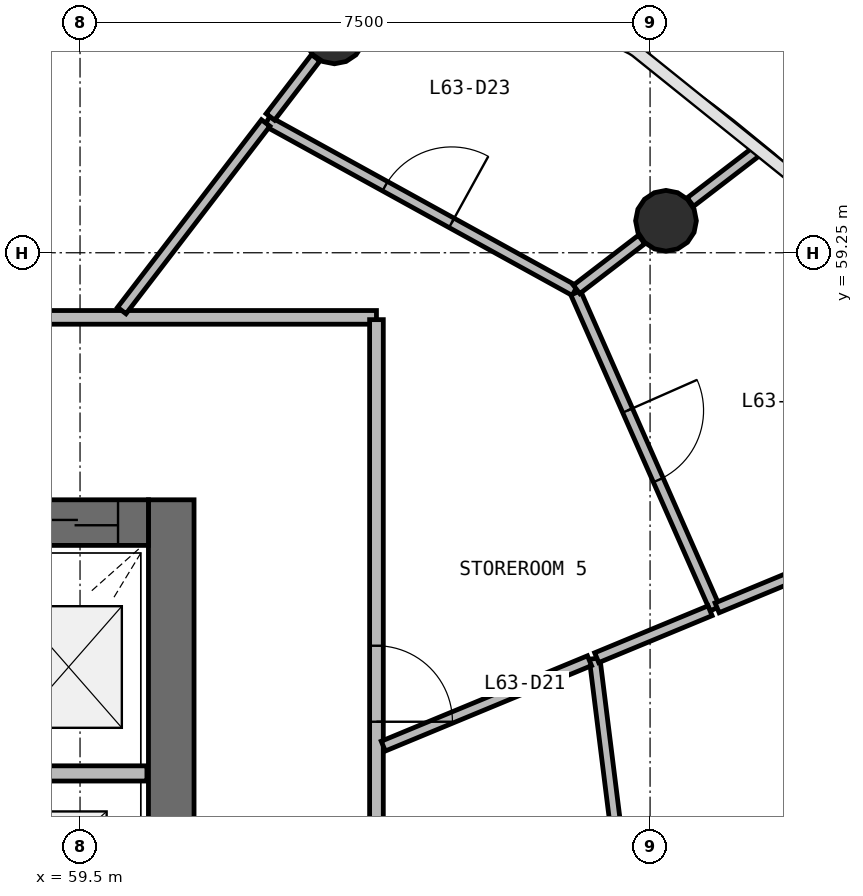
"""IFC4 building model, lengths in metres.
Left out: names, types, materials, properties, quantities, classifications, styles, units other than length and angle.
Written with IfcOpenShell. Run it as: python <this file> out.ifc"""

import sys

from ifc_helpers import new_model, si_unit, direction, frame, frame_2d, origin, origin_2d, place, context, subcontext, project, spatial, rectangle, circle, extrude, source, transform, mapped, element, fill, save


model = new_model("IFC4")
c1 = context("Model", 3, precision=1e-05, world=origin(), true_north=direction((0.0, 1.0)))
c2 = subcontext(c1, "Body", "Model", "MODEL_VIEW")
j1 = project(units=[si_unit("LENGTHUNIT", "METRE"), si_unit("PLANEANGLEUNIT", "RADIAN")], contexts=[c1])
p1 = place(None, origin())
s1 = spatial("IfcSite", under=j1, at=p1, CompositionType="ELEMENT")
p2 = place(p1, origin())
s2 = spatial("IfcBuilding", under=s1, at=p2, CompositionType="ELEMENT")
p3 = place(p2, frame((0.0, 0.0, 257.9)))
s3 = spatial("IfcBuildingStorey", under=s2, at=p3, CompositionType="ELEMENT", Elevation=257.9)
p4 = place(p3, frame((60.7, 40.0, 0.0), z_axis=(0.0, 0.0, 1.0), x_axis=(0.0, 1.0, 0.0)))
e1 = element("IfcWall", 1, at=p4, inside=s3, PredefinedType="SHEAR", context=c2, shape_type="SweptSolid", body=[
    extrude(rectangle(XDim=16.0, YDim=0.6, at=frame_2d((8.0, 0.0))), origin(), (0.0, 0.0, 1.0), 3.9),
])
p5 = place(p4, frame((7.1, 0.0, 0.0)))
e2 = element("IfcOpeningElement", 2, at=p5, cuts=e1, PredefinedType="OPENING", context=c2, shape_type="SweptSolid", body=[
    extrude(rectangle(XDim=1.8, YDim=2.1, at=frame_2d((0.9, 1.05))), frame((0.0, 0.31, 0.0), z_axis=(0.0, -1.0, 0.0), x_axis=(1.0, 0.0, 0.0)), (0.0, 0.0, 1.0), 0.62),
])
p6 = place(p3, frame((60.4, 55.7, 0.0), z_axis=(0.0, 0.0, 1.0), x_axis=(-1.0, 0.0, 0.0)))
e3 = element("IfcWall", 3, at=p6, inside=s3, PredefinedType="SHEAR", context=c2, shape_type="SweptSolid", body=[
    extrude(rectangle(XDim=16.8, YDim=0.6, at=frame_2d((8.4, 0.0))), origin(), (0.0, 0.0, 1.0), 3.9),
])
p7 = place(p6, frame((0.4, 0.0, 0.0)))
e4 = element("IfcOpeningElement", 4, at=p7, cuts=e3, PredefinedType="OPENING", context=c2, shape_type="SweptSolid", body=[
    extrude(rectangle(XDim=1.1, YDim=2.1, at=frame_2d((0.55, 1.05))), frame((0.0, 0.31, 0.0), z_axis=(0.0, -1.0, 0.0), x_axis=(1.0, 0.0, 0.0)), (0.0, 0.0, 1.0), 0.62),
])
p8 = place(p6, frame((10.3, 0.0, 0.0)))
e5 = element("IfcOpeningElement", 5, at=p8, cuts=e3, PredefinedType="OPENING", context=c2, shape_type="SweptSolid", body=[
    extrude(rectangle(XDim=1.2, YDim=2.1, at=frame_2d((0.6, 1.05))), frame((0.0, 0.31, 0.0), z_axis=(0.0, -1.0, 0.0), x_axis=(1.0, 0.0, 0.0)), (0.0, 0.0, 1.0), 0.62),
])
p9 = place(p6, frame((7.25, 0.0, 0.0)))
e6 = element("IfcOpeningElement", 6, at=p9, cuts=e3, PredefinedType="OPENING", context=c2, shape_type="SweptSolid", body=[
    extrude(rectangle(XDim=1.1, YDim=2.1, at=frame_2d((0.55, 1.05))), frame((0.0, 0.31, 0.0), z_axis=(0.0, -1.0, 0.0), x_axis=(1.0, 0.0, 0.0)), (0.0, 0.0, 1.0), 0.62),
])
m1 = source(origin(), c2, "Body", "SweptSolid", [
    extrude(circle(Radius=0.4, at=origin_2d()), origin(), (0.0, 0.0, 1.0), 3.9),
])
for number, where, z_axis, x_axis in (
    (7, (67.209, 59.671, 0.0), (0.0, 0.0, 1.0), (1.0, 0.0, 0.0)),
    (8, (62.847, 62.136, 0.0), (0.0, 0.0, 1.0), (1.0, 0.0, 0.0)),
):
    element("IfcColumn", number, at=place(p3, frame(where, z_axis=z_axis, x_axis=x_axis)), inside=s3, PredefinedType="COLUMN", context=c2, shape_type="MappedRepresentation", body=[
        mapped(m1, transform((0.0, 0.0, 0.0), scale=1.0)),
    ])
p10 = place(p3, frame((60.38, 52.4, 0.0), z_axis=(0.0, 0.0, 1.0), x_axis=(-1.0, 0.0, 0.0)))
e9 = element("IfcWall", 9, at=p10, inside=s3, PredefinedType="SOLIDWALL", context=c2, shape_type="SweptSolid", body=[
    extrude(rectangle(XDim=1.85, YDim=0.2, at=frame_2d((0.925, 0.0))), origin(), (0.0, 0.0, 1.0), 3.58),
])
p11 = place(p3, frame((40.6, 58.4, 0.0), z_axis=(0.0, 0.0, 1.0), x_axis=(1.0, 0.0, 0.0)))
e10 = element("IfcWall", 10, at=p11, inside=s3, PredefinedType="PARTITIONING", context=c2, shape_type="SweptSolid", body=[
    extrude(rectangle(XDim=22.8, YDim=0.18, at=frame_2d((11.4, 0.0))), origin(), (0.0, 0.0, 1.0), 2.88),
])
p12 = place(p11, frame((10.95, 0.0, 0.0)))
e11 = element("IfcOpeningElement", 11, at=p12, cuts=e10, PredefinedType="OPENING", context=c2, shape_type="SweptSolid", body=[
    extrude(rectangle(XDim=1.0, YDim=2.1, at=frame_2d((0.5, 1.05))), frame((0.0, 0.1, 0.0), z_axis=(0.0, -1.0, 0.0), x_axis=(1.0, 0.0, 0.0)), (0.0, 0.0, 1.0), 0.2),
])
p13 = place(p11, frame((5.75, 0.0, 0.0)))
e12 = element("IfcOpeningElement", 12, at=p13, cuts=e10, PredefinedType="OPENING", context=c2, shape_type="SweptSolid", body=[
    extrude(rectangle(XDim=1.0, YDim=2.1, at=frame_2d((0.5, 1.05))), frame((0.0, 0.1, 0.0), z_axis=(0.0, -1.0, 0.0), x_axis=(1.0, 0.0, 0.0)), (0.0, 0.0, 1.0), 0.2),
])
p14 = place(p3, frame((63.4, 58.37, 0.0), z_axis=(0.0, 0.0, 1.0), x_axis=(0.0, -1.0, 0.0)))
e13 = element("IfcWall", 13, at=p14, inside=s3, PredefinedType="PARTITIONING", context=c2, shape_type="SweptSolid", body=[
    extrude(rectangle(XDim=20.74, YDim=0.18, at=frame_2d((10.37, 0.0))), origin(), (0.0, 0.0, 1.0), 2.88),
])
p15 = place(p14, frame((9.99, 0.0, 0.0)))
e14 = element("IfcOpeningElement", 14, at=p15, cuts=e13, PredefinedType="OPENING", context=c2, shape_type="SweptSolid", body=[
    extrude(rectangle(XDim=0.9, YDim=2.1, at=frame_2d((0.45, 1.05))), frame((0.0, 0.1, 0.0), z_axis=(0.0, -1.0, 0.0), x_axis=(1.0, 0.0, 0.0)), (0.0, 0.0, 1.0), 0.2),
])
p16 = place(p14, frame((7.79, 0.0, 0.0)))
e15 = element("IfcOpeningElement", 15, at=p16, cuts=e13, PredefinedType="OPENING", context=c2, shape_type="SweptSolid", body=[
    extrude(rectangle(XDim=0.9, YDim=2.1, at=frame_2d((0.45, 1.05))), frame((0.0, 0.1, 0.0), z_axis=(0.0, -1.0, 0.0), x_axis=(1.0, 0.0, 0.0)), (0.0, 0.0, 1.0), 0.2),
])
p17 = place(p14, frame((4.29, 0.0, 0.0)))
e16 = element("IfcOpeningElement", 16, at=p17, cuts=e13, PredefinedType="OPENING", context=c2, shape_type="SweptSolid", body=[
    extrude(rectangle(XDim=1.0, YDim=2.1, at=frame_2d((0.5, 1.05))), frame((0.0, 0.1, 0.0), z_axis=(0.0, -1.0, 0.0), x_axis=(1.0, 0.0, 0.0)), (0.0, 0.0, 1.0), 0.2),
])
p18 = place(p14, frame((15.49, 0.0, 0.0)))
e17 = element("IfcOpeningElement", 17, at=p18, cuts=e13, PredefinedType="OPENING", context=c2, shape_type="SweptSolid", body=[
    extrude(rectangle(XDim=1.0, YDim=2.1, at=frame_2d((0.5, 1.05))), frame((0.0, 0.1, 0.0), z_axis=(0.0, -1.0, 0.0), x_axis=(1.0, 0.0, 0.0)), (0.0, 0.0, 1.0), 0.2),
])
p19 = place(p14, frame((12.09, 0.0, 0.0)))
e18 = element("IfcOpeningElement", 18, at=p19, cuts=e13, PredefinedType="OPENING", context=c2, shape_type="SweptSolid", body=[
    extrude(rectangle(XDim=1.0, YDim=2.1, at=frame_2d((0.5, 1.05))), frame((0.0, 0.1, 0.0), z_axis=(0.0, -1.0, 0.0), x_axis=(1.0, 0.0, 0.0)), (0.0, 0.0, 1.0), 0.2),
])
p20 = place(p3, frame((61.961, 60.981, 0.0), z_axis=(0.0, 0.0, 1.0), x_axis=(0.875806364123, -0.482662628096, 0.0)))
e19 = element("IfcWall", 19, at=p20, inside=s3, PredefinedType="PARTITIONING", context=c2, shape_type="SweptSolid", body=[
    extrude(rectangle(XDim=4.623, YDim=0.14, at=frame_2d((2.312, 0.0))), origin(), (0.0, 0.0, 1.0), 2.88),
])
p21 = place(p20, frame((1.773, 0.0, 0.0)))
e20 = element("IfcOpeningElement", 20, at=p21, cuts=e19, PredefinedType="OPENING", context=c2, shape_type="SweptSolid", body=[
    extrude(rectangle(XDim=1.0, YDim=2.1, at=frame_2d((0.5, 1.05))), frame((0.0, 0.08, 0.0), z_axis=(0.0, -1.0, 0.0), x_axis=(1.0, 0.0, 0.0)), (0.0, 0.0, 1.0), 0.16),
])
p22 = place(p3, frame((66.021, 58.722, 0.0), z_axis=(0.0, 0.0, 1.0), x_axis=(0.403558147764, -0.914953999594, 0.0)))
e21 = element("IfcWall", 21, at=p22, inside=s3, PredefinedType="PARTITIONING", context=c2, shape_type="SweptSolid", body=[
    extrude(rectangle(XDim=4.542, YDim=0.14, at=frame_2d((2.271, 0.0))), origin(), (0.0, 0.0, 1.0), 2.88),
])
p23 = place(p22, frame((1.691, 0.0, 0.0)))
e22 = element("IfcOpeningElement", 22, at=p23, cuts=e21, PredefinedType="OPENING", context=c2, shape_type="SweptSolid", body=[
    extrude(rectangle(XDim=1.0, YDim=2.1, at=frame_2d((0.5, 1.05))), frame((0.0, 0.08, 0.0), z_axis=(0.0, -1.0, 0.0), x_axis=(1.0, 0.0, 0.0)), (0.0, 0.0, 1.0), 0.16),
])
p24 = place(p3, frame((66.766, 49.944, 0.0), z_axis=(0.0, 0.0, 1.0), x_axis=(-0.124094865126, 0.992270358546, 0.0)))
e23 = element("IfcWall", 23, at=p24, inside=s3, PredefinedType="PARTITIONING", context=c2, shape_type="SweptSolid", body=[
    extrude(rectangle(XDim=3.998, YDim=0.14, at=frame_2d((1.999, 0.0))), origin(), (0.0, 0.0, 1.0), 2.88),
])
p25 = place(p3, frame((60.049, 58.49, 0.0), z_axis=(0.0, 0.0, 1.0), x_axis=(0.608731458137, 0.79337633685, 0.0)))
e24 = element("IfcWall", 24, at=p25, inside=s3, PredefinedType="PARTITIONING", context=c2, shape_type="SweptSolid", body=[
    extrude(rectangle(XDim=3.11, YDim=0.14, at=frame_2d((1.555, 0.0))), origin(), (0.0, 0.0, 1.0), 2.88),
])
p26 = place(p3, frame((63.49, 52.759, 0.0), z_axis=(0.0, 0.0, 1.0), x_axis=(0.923884097698, 0.382672410844, 0.0)))
e25 = element("IfcWall", 25, at=p26, inside=s3, PredefinedType="PARTITIONING", context=c2, shape_type="SweptSolid", body=[
    extrude(rectangle(XDim=2.937, YDim=0.14, at=frame_2d((1.468, 0.0))), origin(), (0.0, 0.0, 1.0), 2.88),
])
p27 = place(p3, frame((67.882, 54.579, 0.0), z_axis=(0.0, 0.0, 1.0), x_axis=(0.923906367218, 0.382618641225, 0.0)))
e26 = element("IfcWall", 26, at=p27, inside=s3, PredefinedType="PARTITIONING", context=c2, shape_type="SweptSolid", body=[
    extrude(rectangle(XDim=2.667, YDim=0.14, at=frame_2d((1.333, 0.0))), origin(), (0.0, 0.0, 1.0), 2.88),
])
p28 = place(p3, frame((66.298, 53.922, 0.0), z_axis=(0.0, 0.0, 1.0), x_axis=(0.923849088281, 0.382756922972, 0.0)))
e27 = element("IfcWall", 27, at=p28, inside=s3, PredefinedType="PARTITIONING", context=c2, shape_type="SweptSolid", body=[
    extrude(rectangle(XDim=1.615, YDim=0.14, at=frame_2d((0.807, 0.0))), origin(), (0.0, 0.0, 1.0), 2.88),
])
p29 = place(p3, frame((67.531, 59.917, 0.0), z_axis=(0.0, 0.0, 1.0), x_axis=(0.793297066138, 0.608834759895, 0.0)))
e28 = element("IfcWall", 28, at=p29, inside=s3, PredefinedType="PARTITIONING", context=c2, shape_type="SweptSolid", body=[
    extrude(rectangle(XDim=1.118, YDim=0.14, at=frame_2d((0.559, 0.0))), origin(), (0.0, 0.0, 1.0), 2.88),
])
p30 = place(p3, frame((66.033, 58.768, 0.0), z_axis=(0.0, 0.0, 1.0), x_axis=(0.793322040953, 0.60880221693, 0.0)))
e29 = element("IfcWall", 29, at=p30, inside=s3, PredefinedType="PARTITIONING", context=c2, shape_type="SweptSolid", body=[
    extrude(rectangle(XDim=1.078, YDim=0.14, at=frame_2d((0.539, 0.0))), origin(), (0.0, 0.0, 1.0), 2.88),
])
p31 = place(p3, frame((62.004, 61.037, 0.0), z_axis=(0.0, 0.0, 1.0), x_axis=(0.608651106813, 0.793437981304, 0.0)))
e30 = element("IfcWall", 30, at=p31, inside=s3, PredefinedType="PARTITIONING", context=c2, shape_type="SweptSolid", body=[
    extrude(rectangle(XDim=0.98, YDim=0.14, at=frame_2d((0.49, 0.0))), origin(), (0.0, 0.0, 1.0), 2.88),
])
m2 = source(origin(), c2, "Body", "SweptSolid", [
    extrude(rectangle(XDim=1.1, YDim=2.1, at=frame_2d((0.55, 1.05))), frame((0.0, 0.025, 0.0), z_axis=(0.0, -1.0, 0.0), x_axis=(1.0, 0.0, 0.0)), (0.0, 0.0, 1.0), 0.05),
])
p32 = place(p7, origin())
e31 = element("IfcDoor", 31, at=p32, inside=s3, OperationType="DOUBLE_DOOR_SLIDING", PredefinedType="USERDEFINED", context=c2, shape_type="MappedRepresentation", body=[
    mapped(m2, transform((0.0, 0.0, 0.0), scale=1.0)),
])
fill(e4, e31)
m3 = source(origin(), c2, "Body", "SweptSolid", [
    extrude(rectangle(XDim=1.0, YDim=2.1, at=frame_2d((0.5, 1.05))), frame((0.0, 0.025, 0.0), z_axis=(0.0, -1.0, 0.0), x_axis=(1.0, 0.0, 0.0)), (0.0, 0.0, 1.0), 0.05),
])
p33 = place(p17, origin())
e32 = element("IfcDoor", 32, at=p33, inside=s3, OperationType="SINGLE_SWING_RIGHT", PredefinedType="DOOR", context=c2, shape_type="MappedRepresentation", body=[
    mapped(m3, transform((0.0, 0.0, 0.0), scale=1.0)),
])
fill(e16, e32)
p34 = place(p23, origin())
e33 = element("IfcDoor", 33, at=p34, inside=s3, OperationType="SINGLE_SWING_LEFT", PredefinedType="DOOR", context=c2, shape_type="MappedRepresentation", body=[
    mapped(m3, transform((0.0, 0.0, 0.0), scale=1.0)),
])
fill(e22, e33)
p35 = place(p21, origin())
e34 = element("IfcDoor", 34, at=p35, inside=s3, OperationType="SINGLE_SWING_RIGHT", PredefinedType="DOOR", context=c2, shape_type="MappedRepresentation", body=[
    mapped(m3, transform((0.0, 0.0, 0.0), scale=1.0)),
])
fill(e20, e34)
save(model, sys.argv[1])
